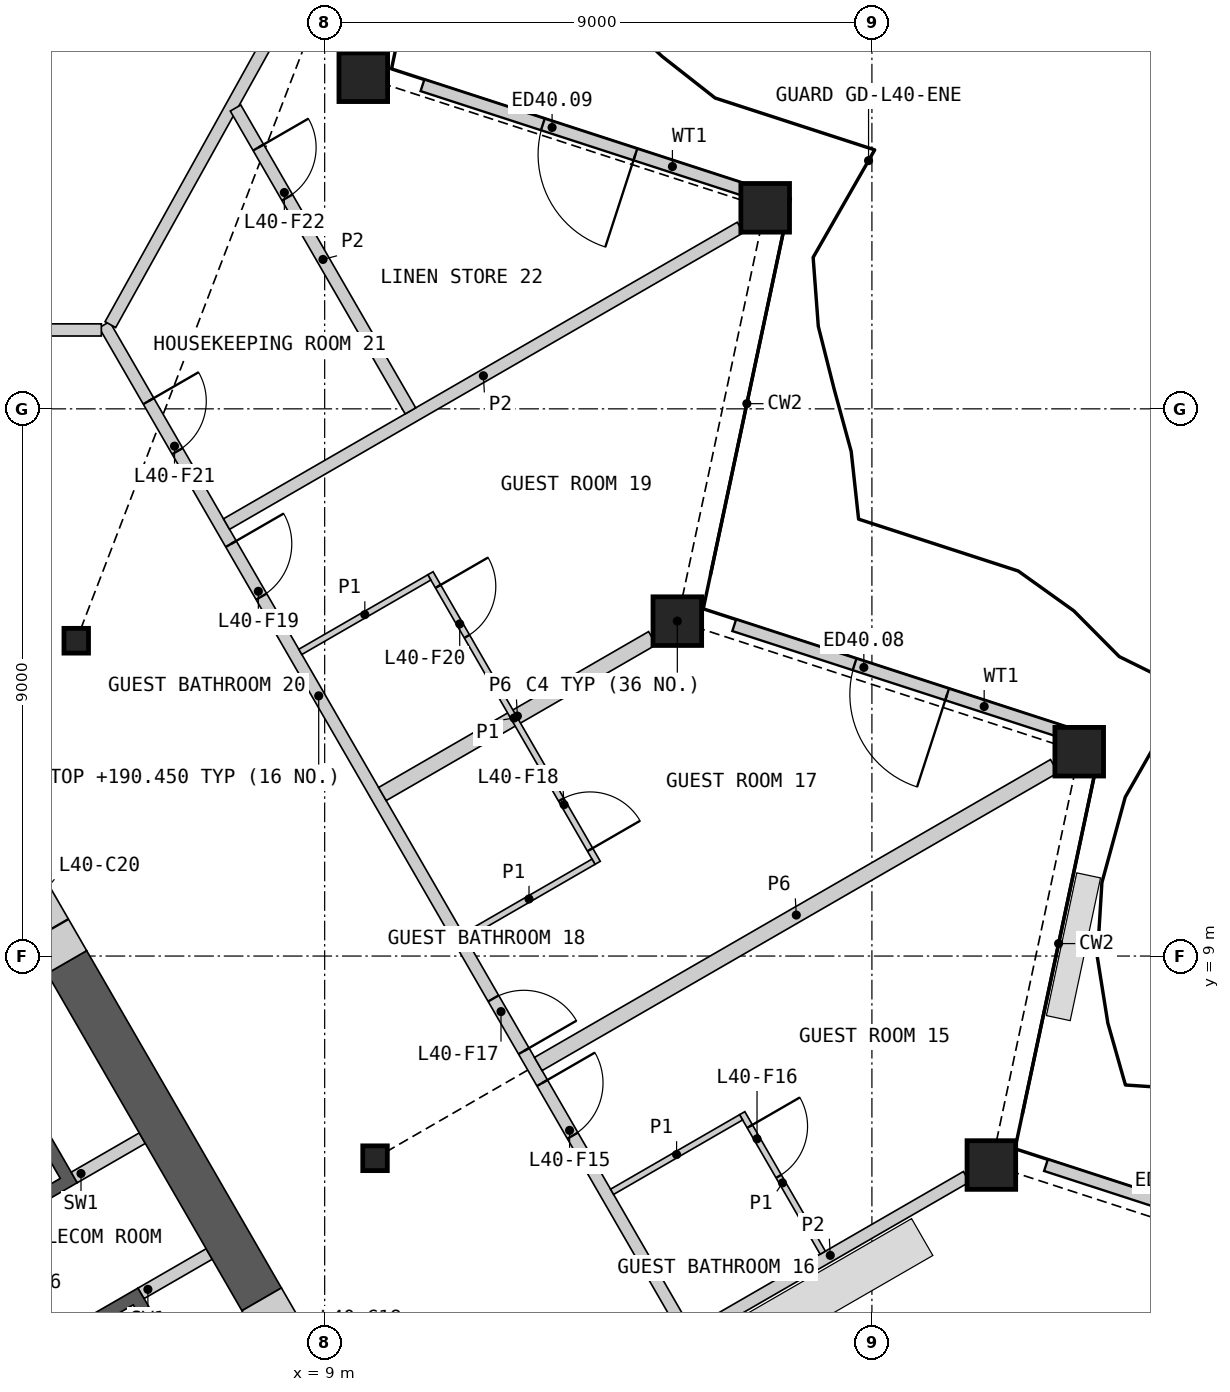
"""IFC4 building model, lengths in metres.
Left out: names, types, materials, properties, quantities, classifications, styles, units other than length and angle.
Written with IfcOpenShell. Run it as: python <this file> out.ifc"""

import sys

from ifc_helpers import new_model, si_unit, direction, frame, frame_2d, origin, origin_2d, place, context, subcontext, project, spatial, polyline, rectangle, hollow_rectangle, i_section, outline, extrude, element, fill, save


model = new_model("IFC4")
c1 = context("Model", 3, precision=1e-05, world=origin(), true_north=direction((0.0, 1.0)))
c2 = subcontext(c1, "Body", "Model", "MODEL_VIEW")
j1 = project(units=[si_unit("LENGTHUNIT", "METRE"), si_unit("PLANEANGLEUNIT", "RADIAN")], contexts=[c1])
p1 = place(None, origin())
s1 = spatial("IfcSite", under=j1, at=p1, CompositionType="ELEMENT")
p2 = place(p1, origin())
s2 = spatial("IfcBuilding", under=s1, at=p2, CompositionType="ELEMENT")
p3 = place(p2, frame((0.0, 0.0, 187.2)))
s3 = spatial("IfcBuildingStorey", under=s2, at=p3, CompositionType="ELEMENT", Elevation=187.2)
for number, where, z_axis, x_axis in (
    (1, (19.965, 5.563, 0.0), (0.0, 0.0, 1.0), (1.0, 0.0, 0.0)),
    (2, (21.409, 12.361, 0.0), (0.0, 0.0, 1.0), (1.0, 0.0, 0.0)),
    (3, (14.8, 14.508, 0.0), (0.0, 0.0, 1.0), (1.0, 0.0, 0.0)),
    (4, (16.245, 21.306, 0.0), (0.0, 0.0, 1.0), (1.0, 0.0, 0.0)),
    (5, (9.635, 23.454, 0.0), (0.0, 0.0, 1.0), (1.0, 0.0, 0.0)),
):
    element("IfcColumn", number, at=place(p3, frame(where, z_axis=z_axis, x_axis=x_axis)), inside=s3, PredefinedType="COLUMN", context=c2, shape_type="SweptSolid", body=[
        extrude(hollow_rectangle(XDim=0.8, YDim=0.8, WallThickness=0.05, at=origin_2d()), origin(), (0.0, 0.0, 1.0), 3.6),
    ])
for number, where, z_axis, x_axis in (
    (6, (9.828, 5.675, 0.0), (0.0, 0.0, 1.0), (1.0, 0.0, 0.0)),
    (7, (4.914, 14.186, 0.0), (0.0, 0.0, 1.0), (1.0, 0.0, 0.0)),
):
    element("IfcColumn", number, at=place(p3, frame(where, z_axis=z_axis, x_axis=x_axis)), inside=s3, PredefinedType="COLUMN", context=c2, shape_type="SweptSolid", body=[
        extrude(i_section(OverallWidth=0.404, OverallDepth=0.407, WebThickness=0.027, FlangeThickness=0.044, at=origin_2d()), origin(), (0.0, 0.0, 1.0), 3.6),
    ])
p4 = place(p3, frame((26.344, 3.779, 0.0), z_axis=(0.0, 0.0, 1.0), x_axis=(-0.951049633358, 0.309038177075, 0.0)))
e8 = element("IfcWall", 8, at=p4, inside=s3, PredefinedType="SOLIDWALL", context=c2, shape_type="SweptSolid", body=[
    extrude(rectangle(XDim=5.763, YDim=0.2, at=frame_2d((2.881, 0.0))), origin(), (0.0, 0.0, 1.0), 2.701),
])
p5 = place(p4, frame((2.082, 0.0, 0.0)))
e9 = element("IfcOpeningElement", 9, at=p5, cuts=e8, PredefinedType="OPENING", context=c2, shape_type="SweptSolid", body=[
    extrude(rectangle(XDim=1.6, YDim=2.4, at=frame_2d((0.8, 1.2))), frame((0.0, 0.11, 0.0), z_axis=(0.0, -1.0, 0.0), x_axis=(1.0, 0.0, 0.0)), (0.0, 0.0, 1.0), 0.22),
])
p6 = place(p3, frame((21.217, 12.659, 0.0), z_axis=(0.0, 0.0, 1.0), x_axis=(-0.951053678976, 0.30902572661, 0.0)))
e10 = element("IfcWall", 10, at=p6, inside=s3, PredefinedType="SOLIDWALL", context=c2, shape_type="SweptSolid", body=[
    extrude(rectangle(XDim=5.763, YDim=0.2, at=frame_2d((2.882, 0.0))), origin(), (0.0, 0.0, 1.0), 2.701),
])
p7 = place(p6, frame((2.082, 0.0, 0.0)))
e11 = element("IfcOpeningElement", 11, at=p7, cuts=e10, PredefinedType="OPENING", context=c2, shape_type="SweptSolid", body=[
    extrude(rectangle(XDim=1.6, YDim=2.4, at=frame_2d((0.8, 1.2))), frame((0.0, 0.11, 0.0), z_axis=(0.0, -1.0, 0.0), x_axis=(1.0, 0.0, 0.0)), (0.0, 0.0, 1.0), 0.22),
])
p8 = place(p3, frame((16.089, 21.54, 0.0), z_axis=(0.0, 0.0, 1.0), x_axis=(-0.951053678976, 0.30902572661, 0.0)))
e12 = element("IfcWall", 12, at=p8, inside=s3, PredefinedType="SOLIDWALL", context=c2, shape_type="SweptSolid", body=[
    extrude(rectangle(XDim=5.763, YDim=0.2, at=frame_2d((2.882, 0.0))), origin(), (0.0, 0.0, 1.0), 2.701),
])
p9 = place(p8, frame((2.082, 0.0, 0.0)))
e13 = element("IfcOpeningElement", 13, at=p9, cuts=e12, PredefinedType="OPENING", context=c2, shape_type="SweptSolid", body=[
    extrude(rectangle(XDim=1.6, YDim=2.4, at=frame_2d((0.8, 1.2))), frame((0.0, 0.11, 0.0), z_axis=(0.0, -1.0, 0.0), x_axis=(1.0, 0.0, 0.0)), (0.0, 0.0, 1.0), 0.22),
])
p10 = place(p3, origin())
e14 = element("IfcWall", 14, at=p10, inside=s3, PredefinedType="SHEAR", context=c2, shape_type="SweptSolid", body=[
    extrude(outline(polyline([(1.561, 6.097), (3.731, 7.35), (4.931, 5.272), (2.76, 4.019), (2.66, 4.192), (4.652, 5.342), (3.652, 7.074), (1.66, 5.924), (1.561, 6.097)])), origin(), (0.0, 0.0, 1.0), 3.25),
])
p11 = place(p3, origin())
e15 = element("IfcWall", 15, at=p11, inside=s3, PredefinedType="SHEAR", context=c2, shape_type="SweptSolid", body=[
    extrude(outline(polyline([(3.76, 2.287), (5.931, 3.54), (8.231, -0.444), (6.061, -1.697), (5.96, -1.524), (7.952, -0.374), (5.852, 3.263), (3.861, 2.113), (3.76, 2.287)])), origin(), (0.0, 0.0, 1.0), 3.25),
])
p12 = place(p3, frame((5.817, -1.476, 0.0), z_axis=(0.0, 0.0, 1.0), x_axis=(-0.500002616675, 0.866023893041, 0.0)))
e16 = element("IfcWall", 16, at=p12, inside=s3, PredefinedType="SOLIDWALL", context=c2, shape_type="SweptSolid", body=[
    extrude(rectangle(XDim=8.373, YDim=0.2, at=frame_2d((4.187, 0.0))), origin(), (0.0, 0.0, 1.0), 3.25),
])
p13 = place(p12, frame((1.537, 0.0, 0.0)))
e17 = element("IfcOpeningElement", 17, at=p13, cuts=e16, PredefinedType="OPENING", context=c2, shape_type="SweptSolid", body=[
    extrude(rectangle(XDim=0.9, YDim=2.1, at=frame_2d((0.45, 1.05))), frame((0.0, 0.11, 0.0), z_axis=(0.0, -1.0, 0.0), x_axis=(1.0, 0.0, 0.0)), (0.0, 0.0, 1.0), 0.22),
])
p14 = place(p12, frame((4.837, 0.0, 0.0)))
e18 = element("IfcOpeningElement", 18, at=p14, cuts=e16, PredefinedType="OPENING", context=c2, shape_type="SweptSolid", body=[
    extrude(rectangle(XDim=0.9, YDim=2.1, at=frame_2d((0.45, 1.05))), frame((0.0, 0.11, 0.0), z_axis=(0.0, -1.0, 0.0), x_axis=(1.0, 0.0, 0.0)), (0.0, 0.0, 1.0), 0.22),
])
p15 = place(p12, frame((6.937, 0.0, 0.0)))
e19 = element("IfcOpeningElement", 19, at=p15, cuts=e16, PredefinedType="OPENING", context=c2, shape_type="SweptSolid", body=[
    extrude(rectangle(XDim=1.1, YDim=2.1, at=frame_2d((0.55, 1.05))), frame((0.0, 0.11, 0.0), z_axis=(0.0, -1.0, 0.0), x_axis=(1.0, 0.0, 0.0)), (0.0, 0.0, 1.0), 0.22),
])
p16 = place(p3, frame((5.981, 3.453, 0.0), z_axis=(0.0, 0.0, 1.0), x_axis=(0.865968639725, 0.500098305348, 0.0)))
e20 = element("IfcWall", 20, at=p16, inside=s3, PredefinedType="SHEAR", context=c2, shape_type="SweptSolid", body=[
    extrude(rectangle(XDim=1.293, YDim=0.2, at=frame_2d((0.646, 0.0))), origin(), (0.0, 0.0, 1.0), 3.25),
])
p17 = place(p3, frame((4.881, 5.358, 0.0), z_axis=(0.0, 0.0, 1.0), x_axis=(0.866084958089, 0.499896834728, 0.0)))
e21 = element("IfcWall", 21, at=p17, inside=s3, PredefinedType="SHEAR", context=c2, shape_type="SweptSolid", body=[
    extrude(rectangle(XDim=1.293, YDim=0.2, at=frame_2d((0.646, 0.0))), origin(), (0.0, 0.0, 1.0), 3.25),
])
p18 = place(p3, frame((7.964, 3.354, 0.0), z_axis=(0.0, 0.0, 1.0), x_axis=(-0.50002928721, 0.866008494146, 0.0)))
e22 = element("IfcWall", 22, at=p18, inside=s3, PredefinedType="SHEAR", context=c2, shape_type="SweptSolid", body=[
    extrude(rectangle(XDim=6.405, YDim=0.75, at=frame_2d((3.203, 0.0))), origin(), (0.0, 0.0, 1.0), 3.25),
])
p19 = place(p3, frame((9.064, 1.448, 0.0), z_axis=(0.0, 0.0, 1.0), x_axis=(-0.50002983664, 0.866008176907, 0.0)))
e23 = element("IfcWall", 23, at=p19, inside=s3, PredefinedType="SHEAR", context=c2, shape_type="SweptSolid", body=[
    extrude(rectangle(XDim=2.2, YDim=0.75, at=frame_2d((1.1, 0.0))), origin(), (0.0, 0.0, 1.0), 3.25),
])
p20 = place(p19, frame((0.6, 0.0, 0.0)))
e24 = element("IfcOpeningElement", 24, at=p20, cuts=e23, PredefinedType="OPENING", context=c2, shape_type="SweptSolid", body=[
    extrude(rectangle(XDim=1.0, YDim=2.1, at=frame_2d((0.5, 1.05))), frame((0.0, 0.385, 0.0), z_axis=(0.0, -1.0, 0.0), x_axis=(1.0, 0.0, 0.0)), (0.0, 0.0, 1.0), 0.77),
])
p21 = place(p3, frame((4.761, 8.901, 0.0), z_axis=(0.0, 0.0, 1.0), x_axis=(-0.499898558967, 0.866083962871, 0.0)))
e25 = element("IfcWall", 25, at=p21, inside=s3, PredefinedType="SHEAR", context=c2, shape_type="SweptSolid", body=[
    extrude(rectangle(XDim=2.2, YDim=0.75, at=frame_2d((1.1, 0.0))), origin(), (0.0, 0.0, 1.0), 3.25),
])
p22 = place(p21, frame((0.6, 0.0, 0.0)))
e26 = element("IfcOpeningElement", 26, at=p22, cuts=e25, PredefinedType="OPENING", context=c2, shape_type="SweptSolid", body=[
    extrude(rectangle(XDim=1.0, YDim=2.1, at=frame_2d((0.5, 1.05))), frame((0.0, 0.385, 0.0), z_axis=(0.0, -1.0, 0.0), x_axis=(1.0, 0.0, 0.0)), (0.0, 0.0, 1.0), 0.77),
])
p23 = place(p3, frame((5.377, 19.385, 0.0), z_axis=(0.0, 0.0, 1.0), x_axis=(0.500000757641, -0.86602496636, 0.0)))
e27 = element("IfcWall", 27, at=p23, inside=s3, PredefinedType="PARTITIONING", context=c2, shape_type="SweptSolid", body=[
    extrude(rectangle(XDim=28.198, YDim=0.2, at=frame_2d((14.099, 0.0))), origin(), (0.0, 0.0, 1.0), 3.25),
])
p24 = place(p23, frame((22.735, 0.0, 0.0)))
e28 = element("IfcOpeningElement", 28, at=p24, cuts=e27, PredefinedType="OPENING", context=c2, shape_type="SweptSolid", body=[
    extrude(rectangle(XDim=1.8, YDim=2.1, at=frame_2d((0.9, 1.05))), frame((0.0, 0.11, 0.0), z_axis=(0.0, -1.0, 0.0), x_axis=(1.0, 0.0, 0.0)), (0.0, 0.0, 1.0), 0.22),
])
p25 = place(p23, frame((14.402, 0.0, 0.0)))
e29 = element("IfcOpeningElement", 29, at=p25, cuts=e27, PredefinedType="OPENING", context=c2, shape_type="SweptSolid", body=[
    extrude(rectangle(XDim=1.0, YDim=2.1, at=frame_2d((0.5, 1.05))), frame((0.0, 0.11, 0.0), z_axis=(0.0, -1.0, 0.0), x_axis=(1.0, 0.0, 0.0)), (0.0, 0.0, 1.0), 0.22),
])
p26 = place(p23, frame((12.796, 0.0, 0.0)))
e30 = element("IfcOpeningElement", 30, at=p26, cuts=e27, PredefinedType="OPENING", context=c2, shape_type="SweptSolid", body=[
    extrude(rectangle(XDim=1.0, YDim=2.1, at=frame_2d((0.5, 1.05))), frame((0.0, 0.11, 0.0), z_axis=(0.0, -1.0, 0.0), x_axis=(1.0, 0.0, 0.0)), (0.0, 0.0, 1.0), 0.22),
])
p27 = place(p23, frame((4.164, 0.0, 0.0)))
e31 = element("IfcOpeningElement", 31, at=p27, cuts=e27, PredefinedType="OPENING", context=c2, shape_type="SweptSolid", body=[
    extrude(rectangle(XDim=1.0, YDim=2.1, at=frame_2d((0.5, 1.05))), frame((0.0, 0.11, 0.0), z_axis=(0.0, -1.0, 0.0), x_axis=(1.0, 0.0, 0.0)), (0.0, 0.0, 1.0), 0.22),
])
p28 = place(p23, frame((1.452, 0.0, 0.0)))
e32 = element("IfcOpeningElement", 32, at=p28, cuts=e27, PredefinedType="OPENING", context=c2, shape_type="SweptSolid", body=[
    extrude(rectangle(XDim=0.95, YDim=2.1, at=frame_2d((0.475, 1.05))), frame((0.0, 0.11, 0.0), z_axis=(0.0, -1.0, 0.0), x_axis=(1.0, 0.0, 0.0)), (0.0, 0.0, 1.0), 0.22),
])
p29 = place(p3, frame((12.513, 7.225, 0.0), z_axis=(0.0, 0.0, 1.0), x_axis=(0.866032905446, 0.499987006516, 0.0)))
e33 = element("IfcWall", 33, at=p29, inside=s3, PredefinedType="PARTITIONING", context=c2, shape_type="SweptSolid", body=[
    extrude(rectangle(XDim=9.799, YDim=0.25, at=frame_2d((4.899, 0.0))), origin(), (0.0, 0.0, 1.0), 2.404),
])
p30 = place(p3, frame((9.95, 11.665, 0.0), z_axis=(0.0, 0.0, 1.0), x_axis=(0.86603095744, 0.499990380663, 0.0)))
e34 = element("IfcWall", 34, at=p30, inside=s3, PredefinedType="PARTITIONING", context=c2, shape_type="SweptSolid", body=[
    extrude(rectangle(XDim=5.127, YDim=0.25, at=frame_2d((2.563, 0.0))), origin(), (0.0, 0.0, 1.0), 2.404),
])
p31 = place(p3, frame((2.325, 19.298, 0.0), z_axis=(0.0, 0.0, 1.0), x_axis=(1.0, 0.0, 0.0)))
e35 = element("IfcWall", 35, at=p31, inside=s3, PredefinedType="PARTITIONING", context=c2, shape_type="SweptSolid", body=[
    extrude(rectangle(XDim=3.002, YDim=0.2, at=frame_2d((1.501, 0.0))), origin(), (0.0, 0.0, 1.0), 3.25),
])
p32 = place(p3, frame((5.476, 19.385, 0.0), z_axis=(0.0, 0.0, 1.0), x_axis=(0.485729569949, 0.874109137853, 0.0)))
e36 = element("IfcWall", 36, at=p32, inside=s3, PredefinedType="PARTITIONING", context=c2, shape_type="SweptSolid", body=[
    extrude(rectangle(XDim=11.962, YDim=0.2, at=frame_2d((5.981, 0.0))), origin(), (0.0, 0.0, 1.0), 2.404),
])
p33 = place(p3, frame((7.386, 16.105, 0.0), z_axis=(0.0, 0.0, 1.0), x_axis=(0.866023056814, 0.500004065051, 0.0)))
e37 = element("IfcWall", 37, at=p33, inside=s3, PredefinedType="PARTITIONING", context=c2, shape_type="SweptSolid", body=[
    extrude(rectangle(XDim=9.756, YDim=0.2, at=frame_2d((4.878, 0.0))), origin(), (0.0, 0.0, 1.0), 2.404),
])
p34 = place(p3, frame((7.534, 22.948, 0.0), z_axis=(0.0, 0.0, 1.0), x_axis=(0.499991885958, -0.866030088378, 0.0)))
e38 = element("IfcWall", 38, at=p34, inside=s3, PredefinedType="PARTITIONING", context=c2, shape_type="SweptSolid", body=[
    extrude(rectangle(XDim=5.752, YDim=0.2, at=frame_2d((2.876, 0.0))), origin(), (0.0, 0.0, 1.0), 2.404),
])
p35 = place(p34, frame((0.75, 0.0, 0.0)))
e39 = element("IfcOpeningElement", 39, at=p35, cuts=e38, PredefinedType="OPENING", context=c2, shape_type="SweptSolid", body=[
    extrude(rectangle(XDim=0.95, YDim=2.1, at=frame_2d((0.475, 1.05))), frame((0.0, 0.11, 0.0), z_axis=(0.0, -1.0, 0.0), x_axis=(1.0, 0.0, 0.0)), (0.0, 0.0, 1.0), 0.22),
])
p36 = place(p3, frame((15.077, 2.784, 0.0), z_axis=(0.0, 0.0, 1.0), x_axis=(0.866020469142, 0.500008546953, 0.0)))
e40 = element("IfcWall", 40, at=p36, inside=s3, PredefinedType="PARTITIONING", context=c2, shape_type="SweptSolid", body=[
    extrude(rectangle(XDim=5.171, YDim=0.2, at=frame_2d((2.585, 0.0))), origin(), (0.0, 0.0, 1.0), 2.404),
])
p37 = place(p3, frame((10.74, 15.296, 0.0), z_axis=(0.0, 0.0, 1.0), x_axis=(0.500015767406, -0.866016300277, 0.0)))
e41 = element("IfcWall", 41, at=p37, inside=s3, PredefinedType="PARTITIONING", context=c2, shape_type="SweptSolid", body=[
    extrude(rectangle(XDim=5.5, YDim=0.1, at=frame_2d((2.75, 0.0))), origin(), (0.0, 0.0, 1.0), 2.404),
])
p38 = place(p37, frame((4.3, 0.0, 0.0)))
e42 = element("IfcOpeningElement", 42, at=p38, cuts=e41, PredefinedType="OPENING", context=c2, shape_type="SweptSolid", body=[
    extrude(rectangle(XDim=0.95, YDim=2.1, at=frame_2d((0.475, 1.05))), frame((0.0, 0.06, 0.0), z_axis=(0.0, -1.0, 0.0), x_axis=(1.0, 0.0, 0.0)), (0.0, 0.0, 1.0), 0.12),
])
p39 = place(p37, frame((0.25, 0.0, 0.0)))
e43 = element("IfcOpeningElement", 43, at=p39, cuts=e41, PredefinedType="OPENING", context=c2, shape_type="SweptSolid", body=[
    extrude(rectangle(XDim=0.95, YDim=2.1, at=frame_2d((0.475, 1.05))), frame((0.0, 0.06, 0.0), z_axis=(0.0, -1.0, 0.0), x_axis=(1.0, 0.0, 0.0)), (0.0, 0.0, 1.0), 0.12),
])
p40 = place(p3, frame((15.867, 6.416, 0.0), z_axis=(0.0, 0.0, 1.0), x_axis=(0.500062700197, -0.865989200783, 0.0)))
e44 = element("IfcWall", 44, at=p40, inside=s3, PredefinedType="PARTITIONING", context=c2, shape_type="SweptSolid", body=[
    extrude(rectangle(XDim=2.65, YDim=0.1, at=frame_2d((1.325, 0.0))), origin(), (0.0, 0.0, 1.0), 2.404),
])
p41 = place(p40, frame((0.25, 0.0, 0.0)))
e45 = element("IfcOpeningElement", 45, at=p41, cuts=e44, PredefinedType="OPENING", context=c2, shape_type="SweptSolid", body=[
    extrude(rectangle(XDim=0.95, YDim=2.1, at=frame_2d((0.475, 1.05))), frame((0.0, 0.06, 0.0), z_axis=(0.0, -1.0, 0.0), x_axis=(1.0, 0.0, 0.0)), (0.0, 0.0, 1.0), 0.12),
])
p42 = place(p3, frame((13.727, 5.123, 0.0), z_axis=(0.0, 0.0, 1.0), x_axis=(0.866032905446, 0.499987006516, 0.0)))
e46 = element("IfcWall", 46, at=p42, inside=s3, PredefinedType="PARTITIONING", context=c2, shape_type="SweptSolid", body=[
    extrude(rectangle(XDim=2.45, YDim=0.1, at=frame_2d((1.225, 0.0))), origin(), (0.0, 0.0, 1.0), 2.404),
])
p43 = place(p3, frame((11.3, 9.326, 0.0), z_axis=(0.0, 0.0, 1.0), x_axis=(0.866014668023, 0.500018594424, 0.0)))
e47 = element("IfcWall", 47, at=p43, inside=s3, PredefinedType="PARTITIONING", context=c2, shape_type="SweptSolid", body=[
    extrude(rectangle(XDim=2.45, YDim=0.1, at=frame_2d((1.225, 0.0))), origin(), (0.0, 0.0, 1.0), 2.404),
])
p44 = place(p3, frame((8.6, 14.003, 0.0), z_axis=(0.0, 0.0, 1.0), x_axis=(0.866032905446, 0.499987006516, 0.0)))
e48 = element("IfcWall", 48, at=p44, inside=s3, PredefinedType="PARTITIONING", context=c2, shape_type="SweptSolid", body=[
    extrude(rectangle(XDim=2.45, YDim=0.1, at=frame_2d((1.225, 0.0))), origin(), (0.0, 0.0, 1.0), 2.404),
])
p45 = place(p7, origin())
e49 = element("IfcDoor", 49, at=p45, inside=s3, OperationType="DOUBLE_DOOR_SINGLE_SWING", PredefinedType="DOOR", context=c2, shape_type="SweptSolid", body=[
    extrude(rectangle(XDim=1.6, YDim=2.4, at=frame_2d((0.8, 1.2))), frame((0.0, 0.025, 0.0), z_axis=(0.0, -1.0, 0.0), x_axis=(1.0, 0.0, 0.0)), (0.0, 0.0, 1.0), 0.05),
])
fill(e11, e49)
p46 = place(p9, origin())
e50 = element("IfcDoor", 50, at=p46, inside=s3, OperationType="DOUBLE_DOOR_SINGLE_SWING", PredefinedType="DOOR", context=c2, shape_type="SweptSolid", body=[
    extrude(rectangle(XDim=1.6, YDim=2.4, at=frame_2d((0.8, 1.2))), frame((0.0, 0.025, 0.0), z_axis=(0.0, -1.0, 0.0), x_axis=(1.0, 0.0, 0.0)), (0.0, 0.0, 1.0), 0.05),
])
fill(e13, e50)
p47 = place(p25, origin())
e51 = element("IfcDoor", 51, at=p47, inside=s3, OperationType="SINGLE_SWING_LEFT", PredefinedType="DOOR", context=c2, shape_type="SweptSolid", body=[
    extrude(rectangle(XDim=1.0, YDim=2.1, at=frame_2d((0.5, 1.05))), frame((0.0, 0.025, 0.0), z_axis=(0.0, -1.0, 0.0), x_axis=(1.0, 0.0, 0.0)), (0.0, 0.0, 1.0), 0.05),
])
fill(e29, e51)
p48 = place(p41, origin())
e52 = element("IfcDoor", 52, at=p48, inside=s3, OperationType="SINGLE_SWING_LEFT", PredefinedType="DOOR", context=c2, shape_type="SweptSolid", body=[
    extrude(rectangle(XDim=0.95, YDim=2.1, at=frame_2d((0.475, 1.05))), frame((0.0, 0.025, 0.0), z_axis=(0.0, -1.0, 0.0), x_axis=(1.0, 0.0, 0.0)), (0.0, 0.0, 1.0), 0.05),
])
fill(e45, e52)
p49 = place(p26, origin())
e53 = element("IfcDoor", 53, at=p49, inside=s3, OperationType="SINGLE_SWING_RIGHT", PredefinedType="DOOR", context=c2, shape_type="SweptSolid", body=[
    extrude(rectangle(XDim=1.0, YDim=2.1, at=frame_2d((0.5, 1.05))), frame((0.0, 0.025, 0.0), z_axis=(0.0, -1.0, 0.0), x_axis=(1.0, 0.0, 0.0)), (0.0, 0.0, 1.0), 0.05),
])
fill(e30, e53)
p50 = place(p38, origin())
e54 = element("IfcDoor", 54, at=p50, inside=s3, OperationType="SINGLE_SWING_RIGHT", PredefinedType="DOOR", context=c2, shape_type="SweptSolid", body=[
    extrude(rectangle(XDim=0.95, YDim=2.1, at=frame_2d((0.475, 1.05))), frame((0.0, 0.025, 0.0), z_axis=(0.0, -1.0, 0.0), x_axis=(1.0, 0.0, 0.0)), (0.0, 0.0, 1.0), 0.05),
])
fill(e42, e54)
p51 = place(p27, origin())
e55 = element("IfcDoor", 55, at=p51, inside=s3, OperationType="SINGLE_SWING_LEFT", PredefinedType="DOOR", context=c2, shape_type="SweptSolid", body=[
    extrude(rectangle(XDim=1.0, YDim=2.1, at=frame_2d((0.5, 1.05))), frame((0.0, 0.025, 0.0), z_axis=(0.0, -1.0, 0.0), x_axis=(1.0, 0.0, 0.0)), (0.0, 0.0, 1.0), 0.05),
])
fill(e31, e55)
p52 = place(p39, origin())
e56 = element("IfcDoor", 56, at=p52, inside=s3, OperationType="SINGLE_SWING_LEFT", PredefinedType="DOOR", context=c2, shape_type="SweptSolid", body=[
    extrude(rectangle(XDim=0.95, YDim=2.1, at=frame_2d((0.475, 1.05))), frame((0.0, 0.025, 0.0), z_axis=(0.0, -1.0, 0.0), x_axis=(1.0, 0.0, 0.0)), (0.0, 0.0, 1.0), 0.05),
])
fill(e43, e56)
p53 = place(p28, origin())
e57 = element("IfcDoor", 57, at=p53, inside=s3, OperationType="SINGLE_SWING_LEFT", PredefinedType="DOOR", context=c2, shape_type="SweptSolid", body=[
    extrude(rectangle(XDim=0.95, YDim=2.1, at=frame_2d((0.475, 1.05))), frame((0.0, 0.025, 0.0), z_axis=(0.0, -1.0, 0.0), x_axis=(1.0, 0.0, 0.0)), (0.0, 0.0, 1.0), 0.05),
])
fill(e32, e57)
p54 = place(p35, origin())
e58 = element("IfcDoor", 58, at=p54, inside=s3, OperationType="SINGLE_SWING_LEFT", PredefinedType="DOOR", context=c2, shape_type="SweptSolid", body=[
    extrude(rectangle(XDim=0.95, YDim=2.1, at=frame_2d((0.475, 1.05))), frame((0.0, 0.025, 0.0), z_axis=(0.0, -1.0, 0.0), x_axis=(1.0, 0.0, 0.0)), (0.0, 0.0, 1.0), 0.05),
])
fill(e39, e58)
save(model, sys.argv[1])
